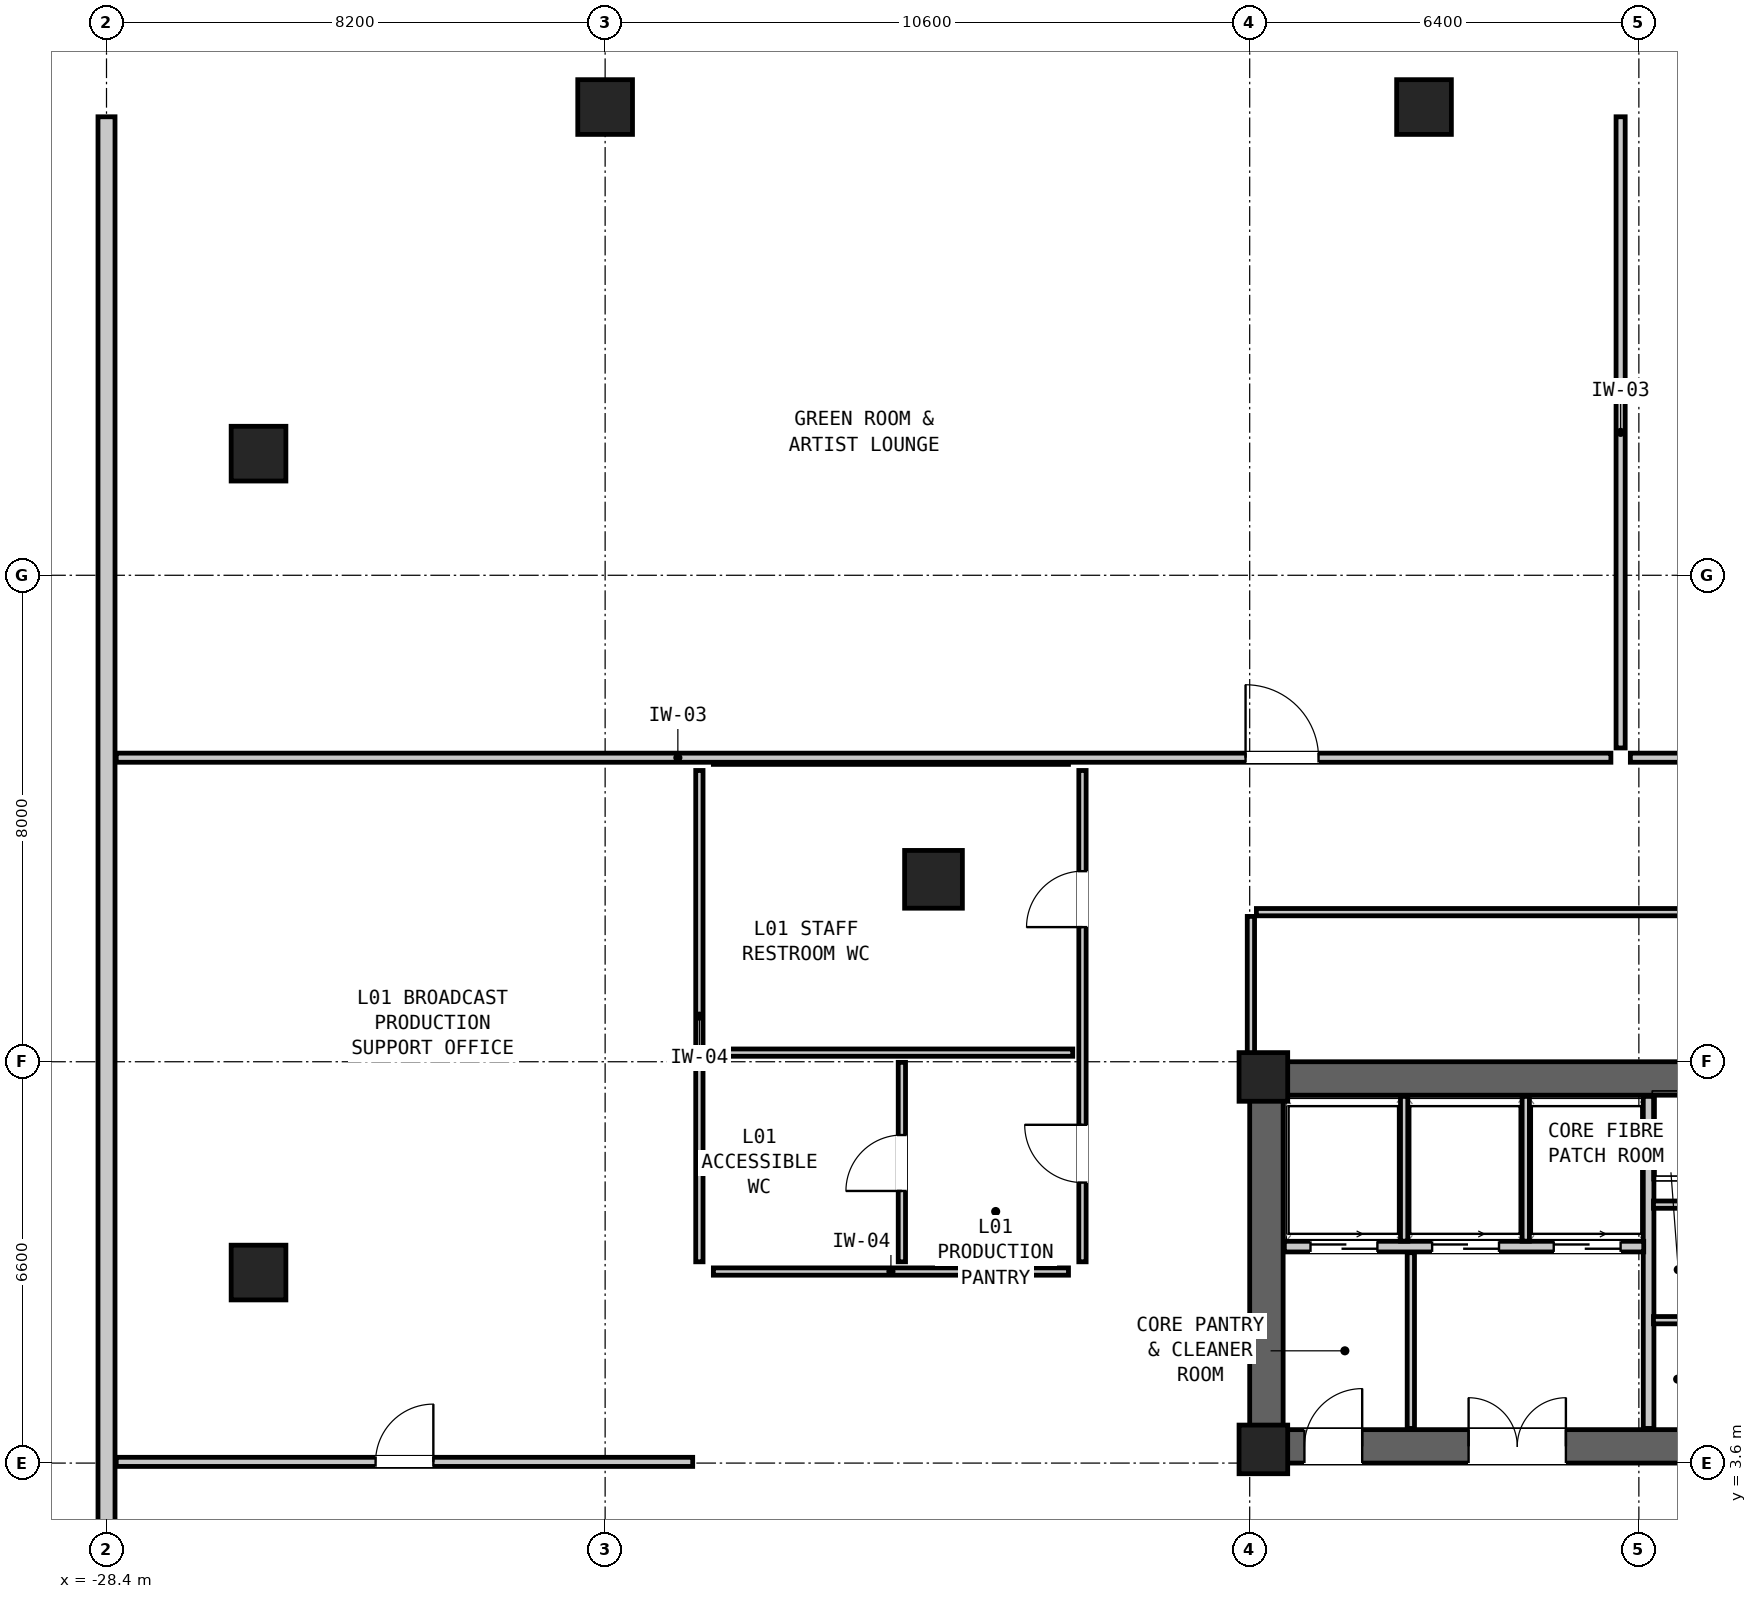
"""IFC4 building model, lengths in metres.
Left out: names, types, materials, properties, quantities, classifications, styles, units other than length and angle.
Written with IfcOpenShell. Run it as: python <this file> out.ifc"""

import sys

from ifc_helpers import new_model, si_unit, direction, frame, frame_2d, origin, origin_2d, place, context, subcontext, project, spatial, rectangle, hollow_rectangle, extrude, element, fill, save


model = new_model("IFC4")
c1 = context("Model", 3, precision=1e-05, world=origin(), true_north=direction((0.0, 1.0)))
c2 = subcontext(c1, "Body", "Model", "MODEL_VIEW")
j1 = project(units=[si_unit("LENGTHUNIT", "METRE"), si_unit("PLANEANGLEUNIT", "RADIAN")], contexts=[c1])
p1 = place(None, origin())
s1 = spatial("IfcSite", under=j1, at=p1, CompositionType="ELEMENT")
p2 = place(p1, origin())
s2 = spatial("IfcBuilding", under=s1, at=p2, CompositionType="ELEMENT")
p3 = place(p2, frame((0.0, 0.0, 5.1)))
s3 = spatial("IfcBuildingStorey", under=s2, at=p3, CompositionType="ELEMENT", Elevation=5.1)
p4 = place(p3, frame((-9.6, 9.925, 0.0), z_axis=(0.0, 0.0, 1.0), x_axis=(1.0, 0.0, 0.0)))
e1 = element("IfcWall", 1, at=p4, inside=s3, PredefinedType="SHEAR", context=c2, shape_type="SweptSolid", body=[
    extrude(rectangle(XDim=19.2, YDim=0.55, at=frame_2d((9.6, 0.0))), origin(), (0.0, 0.0, 1.0), 4.2),
])
p5 = place(p3, frame((-9.6, 3.875, 0.0), z_axis=(0.0, 0.0, 1.0), x_axis=(1.0, 0.0, 0.0)))
e2 = element("IfcWall", 2, at=p5, inside=s3, PredefinedType="SHEAR", context=c2, shape_type="SweptSolid", body=[
    extrude(rectangle(XDim=19.2, YDim=0.55, at=frame_2d((9.6, 0.0))), origin(), (0.0, 0.0, 1.0), 4.2),
])
p6 = place(p5, frame((14.2, 0.0, 0.0)))
e3 = element("IfcOpeningElement", 3, at=p6, cuts=e2, PredefinedType="OPENING", context=c2, shape_type="SweptSolid", body=[
    extrude(rectangle(XDim=1.1, YDim=2.08, at=frame_2d((0.55, 1.04))), frame((0.0, 0.287, 0.0), z_axis=(0.0, -1.0, 0.0), x_axis=(1.0, 0.0, 0.0)), (0.0, 0.0, 1.0), 0.574),
])
p7 = place(p5, frame((8.2, 0.0, 0.0)))
e4 = element("IfcOpeningElement", 4, at=p7, cuts=e2, PredefinedType="OPENING", context=c2, shape_type="SweptSolid", body=[
    extrude(rectangle(XDim=1.15, YDim=2.1, at=frame_2d((0.575, 1.05))), frame((0.0, 0.287, 0.0), z_axis=(0.0, -1.0, 0.0), x_axis=(1.0, 0.0, 0.0)), (0.0, 0.0, 1.0), 0.574),
])
p8 = place(p5, frame((0.9, 0.0, 0.0)))
e5 = element("IfcOpeningElement", 5, at=p8, cuts=e2, PredefinedType="OPENING", context=c2, shape_type="SweptSolid", body=[
    extrude(rectangle(XDim=0.95, YDim=2.1, at=frame_2d((0.475, 1.05))), frame((0.0, 0.287, 0.0), z_axis=(0.0, -1.0, 0.0), x_axis=(1.0, 0.0, 0.0)), (0.0, 0.0, 1.0), 0.574),
])
p9 = place(p5, frame((3.6, 0.0, 0.0)))
e6 = element("IfcOpeningElement", 6, at=p9, cuts=e2, PredefinedType="OPENING", context=c2, shape_type="SweptSolid", body=[
    extrude(rectangle(XDim=1.6, YDim=2.12, at=frame_2d((0.8, 1.06))), frame((0.0, 0.287, 0.0), z_axis=(0.0, -1.0, 0.0), x_axis=(1.0, 0.0, 0.0)), (0.0, 0.0, 1.0), 0.574),
])
p10 = place(p3, frame((-9.325, 3.6, 0.0), z_axis=(0.0, 0.0, 1.0), x_axis=(0.0, 1.0, 0.0)))
e7 = element("IfcWall", 7, at=p10, inside=s3, PredefinedType="SHEAR", context=c2, shape_type="SweptSolid", body=[
    extrude(rectangle(XDim=6.6, YDim=0.55, at=frame_2d((3.3, 0.0))), origin(), (0.0, 0.0, 1.0), 4.2),
])
p11 = place(p3, frame((-14.8, 13.2, 0.0), z_axis=(0.0, 0.0, 1.0), x_axis=(1.0, 0.0, 0.0)))
e8 = element("IfcColumn", 8, at=p11, inside=s3, PredefinedType="COLUMN", context=c2, shape_type="SweptSolid", body=[
    extrude(hollow_rectangle(XDim=0.95, YDim=0.95, WallThickness=0.06, at=origin_2d()), origin(), (0.0, 0.0, 1.0), 4.2),
])
for number, where, z_axis, x_axis in (
    (9, (-6.733, 25.9, 0.0), (0.0, 0.0, 1.0), (1.0, 0.0, 0.0)),
    (10, (-20.2, 25.9, 0.0), (0.0, 0.0, 1.0), (1.0, 0.0, 0.0)),
    (11, (-25.9, 20.2, 0.0), (0.0, 0.0, 1.0), (0.0, 1.0, 0.0)),
    (12, (-25.9, 6.733, 0.0), (0.0, 0.0, 1.0), (0.0, 1.0, 0.0)),
):
    element("IfcColumn", number, at=place(p3, frame(where, z_axis=z_axis, x_axis=x_axis)), inside=s3, PredefinedType="COLUMN", context=c2, shape_type="SweptSolid", body=[
        extrude(hollow_rectangle(XDim=0.9, YDim=0.9, WallThickness=0.055, at=origin_2d()), origin(), (0.0, 0.0, 1.0), 4.2),
    ])
for number, where, z_axis, x_axis in (
    (13, (-9.375, 9.95, 0.0), (0.0, 0.0, 1.0), (1.0, 0.0, 0.0)),
    (14, (-9.375, 3.825, 0.0), (0.0, 0.0, 1.0), (1.0, 0.0, 0.0)),
):
    element("IfcColumn", number, at=place(p3, frame(where, z_axis=z_axis, x_axis=x_axis)), inside=s3, PredefinedType="COLUMN", context=c2, shape_type="SweptSolid", body=[
        extrude(rectangle(XDim=0.8, YDim=0.8, at=origin_2d()), origin(), (0.0, 0.0, 1.0), 4.2),
    ])
p12 = place(p3, frame((-3.04, 4.17, 0.0), z_axis=(0.0, 0.0, 1.0), x_axis=(0.0, 1.0, 0.0)))
e15 = element("IfcWall", 15, at=p12, inside=s3, PredefinedType="PARTITIONING", context=c2, shape_type="SweptSolid", body=[
    extrude(rectangle(XDim=5.46, YDim=0.175, at=frame_2d((2.73, 0.0))), origin(), (0.0, 0.0, 1.0), 3.88),
])
for number, where, z_axis, x_axis in (
    (16, (-2.96, 5.95, 0.0), (0.0, 0.0, 1.0), (1.0, 0.0, 0.0)),
    (17, (-2.96, 7.85, 0.0), (0.0, 0.0, 1.0), (1.0, 0.0, 0.0)),
):
    element("IfcWall", number, at=place(p3, frame(where, z_axis=z_axis, x_axis=x_axis)), inside=s3, PredefinedType="PARTITIONING", context=c2, shape_type="SweptSolid", body=[
        extrude(rectangle(XDim=1.36, YDim=0.12, at=frame_2d((0.68, 0.0))), origin(), (0.0, 0.0, 1.0), 3.88),
    ])
p13 = place(p3, frame((-9.03, 7.16, 0.0), z_axis=(0.0, 0.0, 1.0), x_axis=(1.0, 0.0, 0.0)))
e18 = element("IfcWall", 18, at=p13, inside=s3, PredefinedType="PARTITIONING", context=c2, shape_type="SweptSolid", body=[
    extrude(rectangle(XDim=5.91, YDim=0.175, at=frame_2d((2.955, 0.0))), origin(), (0.0, 0.0, 1.0), 3.88),
])
p14 = place(p13, frame((0.43, 0.0, 0.0)))
e19 = element("IfcOpeningElement", 19, at=p14, cuts=e18, PredefinedType="OPENING", context=c2, shape_type="SweptSolid", body=[
    extrude(rectangle(XDim=1.1, YDim=2.06, at=frame_2d((0.55, 1.03))), frame((0.0, 0.1, 0.0), z_axis=(0.0, -1.0, 0.0), x_axis=(1.0, 0.0, 0.0)), (0.0, 0.0, 1.0), 0.199),
])
p15 = place(p13, frame((2.43, 0.0, 0.0)))
e20 = element("IfcOpeningElement", 20, at=p15, cuts=e18, PredefinedType="OPENING", context=c2, shape_type="SweptSolid", body=[
    extrude(rectangle(XDim=1.1, YDim=2.06, at=frame_2d((0.55, 1.03))), frame((0.0, 0.1, 0.0), z_axis=(0.0, -1.0, 0.0), x_axis=(1.0, 0.0, 0.0)), (0.0, 0.0, 1.0), 0.199),
])
p16 = place(p13, frame((4.43, 0.0, 0.0)))
e21 = element("IfcOpeningElement", 21, at=p16, cuts=e18, PredefinedType="OPENING", context=c2, shape_type="SweptSolid", body=[
    extrude(rectangle(XDim=1.1, YDim=2.06, at=frame_2d((0.55, 1.03))), frame((0.0, 0.1, 0.0), z_axis=(0.0, -1.0, 0.0), x_axis=(1.0, 0.0, 0.0)), (0.0, 0.0, 1.0), 0.199),
])
for number, where, z_axis, x_axis in (
    (22, (-7.06, 7.25, 0.0), (0.0, 0.0, 1.0), (0.0, 1.0, 0.0)),
    (23, (-5.06, 7.25, 0.0), (0.0, 0.0, 1.0), (0.0, 1.0, 0.0)),
):
    element("IfcWall", number, at=place(p3, frame(where, z_axis=z_axis, x_axis=x_axis)), inside=s3, PredefinedType="PARTITIONING", context=c2, shape_type="SweptSolid", body=[
        extrude(rectangle(XDim=2.38, YDim=0.12, at=frame_2d((1.19, 0.0))), origin(), (0.0, 0.0, 1.0), 3.88),
    ])
p17 = place(p3, frame((-6.95, 4.17, 0.0), z_axis=(0.0, 0.0, 1.0), x_axis=(0.0, 1.0, 0.0)))
e24 = element("IfcWall", 24, at=p17, inside=s3, PredefinedType="PARTITIONING", context=c2, shape_type="SweptSolid", body=[
    extrude(rectangle(XDim=2.89, YDim=0.12, at=frame_2d((1.445, 0.0))), origin(), (0.0, 0.0, 1.0), 3.88),
])
for number, where, z_axis, x_axis in (
    (25, (-18.42, 6.75, 0.0), (0.0, 0.0, 1.0), (1.0, 0.0, 0.0)),
    (26, (-18.42, 15.15, 0.0), (0.0, 0.0, 1.0), (1.0, 0.0, 0.0)),
):
    element("IfcWall", number, at=place(p3, frame(where, z_axis=z_axis, x_axis=x_axis)), inside=s3, PredefinedType="PARTITIONING", context=c2, shape_type="SweptSolid", body=[
        extrude(rectangle(XDim=5.84, YDim=0.12, at=frame_2d((2.92, 0.0))), origin(), (0.0, 0.0, 1.0), 3.88),
    ])
p18 = place(p3, frame((-18.65, 6.91, 0.0), z_axis=(0.0, 0.0, 1.0), x_axis=(0.0, 1.0, 0.0)))
e27 = element("IfcWall", 27, at=p18, inside=s3, PredefinedType="PARTITIONING", context=c2, shape_type="SweptSolid", body=[
    extrude(rectangle(XDim=8.08, YDim=0.12, at=frame_2d((4.04, 0.0))), origin(), (0.0, 0.0, 1.0), 3.88),
])
p19 = place(p3, frame((-18.49, 10.35, 0.0), z_axis=(0.0, 0.0, 1.0), x_axis=(1.0, 0.0, 0.0)))
e28 = element("IfcWall", 28, at=p19, inside=s3, PredefinedType="PARTITIONING", context=c2, shape_type="SweptSolid", body=[
    extrude(rectangle(XDim=5.98, YDim=0.12, at=frame_2d((2.99, 0.0))), origin(), (0.0, 0.0, 1.0), 3.88),
])
p20 = place(p3, frame((-15.32, 6.91, 0.0), z_axis=(0.0, 0.0, 1.0), x_axis=(0.0, 1.0, 0.0)))
e29 = element("IfcWall", 29, at=p20, inside=s3, PredefinedType="PARTITIONING", context=c2, shape_type="SweptSolid", body=[
    extrude(rectangle(XDim=3.28, YDim=0.12, at=frame_2d((1.64, 0.0))), origin(), (0.0, 0.0, 1.0), 3.88),
])
p21 = place(p20, frame((1.165, 0.0, 0.0)))
e30 = element("IfcOpeningElement", 30, at=p21, cuts=e29, PredefinedType="OPENING", context=c2, shape_type="SweptSolid", body=[
    extrude(rectangle(XDim=0.92, YDim=2.1, at=frame_2d((0.46, 1.05))), frame((0.0, 0.072, 0.0), z_axis=(0.0, -1.0, 0.0), x_axis=(1.0, 0.0, 0.0)), (0.0, 0.0, 1.0), 0.144),
])
p22 = place(p3, frame((-12.35, 6.91, 0.0), z_axis=(0.0, 0.0, 1.0), x_axis=(0.0, 1.0, 0.0)))
e31 = element("IfcWall", 31, at=p22, inside=s3, PredefinedType="PARTITIONING", context=c2, shape_type="SweptSolid", body=[
    extrude(rectangle(XDim=8.08, YDim=0.12, at=frame_2d((4.04, 0.0))), origin(), (0.0, 0.0, 1.0), 3.88),
])
p23 = place(p22, frame((1.303, 0.0, 0.0)))
e32 = element("IfcOpeningElement", 32, at=p23, cuts=e31, PredefinedType="OPENING", context=c2, shape_type="SweptSolid", body=[
    extrude(rectangle(XDim=0.95, YDim=2.1, at=frame_2d((0.475, 1.05))), frame((0.0, 0.072, 0.0), z_axis=(0.0, -1.0, 0.0), x_axis=(1.0, 0.0, 0.0)), (0.0, 0.0, 1.0), 0.144),
])
p24 = place(p22, frame((5.504, 0.0, 0.0)))
e33 = element("IfcOpeningElement", 33, at=p24, cuts=e31, PredefinedType="OPENING", context=c2, shape_type="SweptSolid", body=[
    extrude(rectangle(XDim=0.92, YDim=2.1, at=frame_2d((0.46, 1.05))), frame((0.0, 0.072, 0.0), z_axis=(0.0, -1.0, 0.0), x_axis=(1.0, 0.0, 0.0)), (0.0, 0.0, 1.0), 0.144),
])
p25 = place(p3, frame((-28.4, -25.74, 0.0), z_axis=(0.0, 0.0, 1.0), x_axis=(0.0, 1.0, 0.0)))
e34 = element("IfcWall", 34, at=p25, inside=s3, PredefinedType="MOVABLE", context=c2, shape_type="SweptSolid", body=[
    extrude(rectangle(XDim=51.48, YDim=0.28, at=frame_2d((25.74, 0.0))), origin(), (0.0, 0.0, 1.0), 3.88),
])
p26 = place(p25, frame((25.255, 0.0, 0.0)))
e35 = element("IfcOpeningElement", 35, at=p26, cuts=e34, PredefinedType="OPENING", context=c2, shape_type="SweptSolid", body=[
    extrude(rectangle(XDim=2.0, YDim=2.14, at=frame_2d((1.0, 1.07))), frame((0.0, 0.152, 0.0), z_axis=(0.0, -1.0, 0.0), x_axis=(1.0, 0.0, 0.0)), (0.0, 0.0, 1.0), 0.304),
])
p27 = place(p3, frame((-28.24, 15.2, 0.0), z_axis=(0.0, 0.0, 1.0), x_axis=(1.0, 0.0, 0.0)))
e36 = element("IfcWall", 36, at=p27, inside=s3, PredefinedType="PARTITIONING", context=c2, shape_type="SweptSolid", body=[
    extrude(rectangle(XDim=24.58, YDim=0.15, at=frame_2d((12.29, 0.0))), origin(), (0.0, 0.0, 1.0), 3.88),
])
p28 = place(p27, frame((18.572, 0.0, 0.0)))
e37 = element("IfcOpeningElement", 37, at=p28, cuts=e36, PredefinedType="OPENING", context=c2, shape_type="SweptSolid", body=[
    extrude(rectangle(XDim=1.2, YDim=2.1, at=frame_2d((0.6, 1.05))), frame((0.0, 0.087, 0.0), z_axis=(0.0, -1.0, 0.0), x_axis=(1.0, 0.0, 0.0)), (0.0, 0.0, 1.0), 0.174),
])
p29 = place(p3, frame((-3.34, 15.2, 0.0), z_axis=(0.0, 0.0, 1.0), x_axis=(1.0, 0.0, 0.0)))
e38 = element("IfcWall", 38, at=p29, inside=s3, PredefinedType="PARTITIONING", context=c2, shape_type="SweptSolid", body=[
    extrude(rectangle(XDim=23.58, YDim=0.15, at=frame_2d((11.79, 0.0))), origin(), (0.0, 0.0, 1.0), 3.88),
])
p30 = place(p29, frame((5.295, 0.0, 0.0)))
e39 = element("IfcOpeningElement", 39, at=p30, cuts=e38, PredefinedType="OPENING", context=c2, shape_type="SweptSolid", body=[
    extrude(rectangle(XDim=1.2, YDim=2.1, at=frame_2d((0.6, 1.05))), frame((0.0, 0.087, 0.0), z_axis=(0.0, -1.0, 0.0), x_axis=(1.0, 0.0, 0.0)), (0.0, 0.0, 1.0), 0.174),
])
p31 = place(p3, frame((-3.5, 15.36, 0.0), z_axis=(0.0, 0.0, 1.0), x_axis=(0.0, 1.0, 0.0)))
e40 = element("IfcWall", 40, at=p31, inside=s3, PredefinedType="PARTITIONING", context=c2, shape_type="SweptSolid", body=[
    extrude(rectangle(XDim=10.38, YDim=0.15, at=frame_2d((5.19, 0.0))), origin(), (0.0, 0.0, 1.0), 3.88),
])
p32 = place(p3, frame((-9.49, 12.66, 0.0), z_axis=(0.0, 0.0, 1.0), x_axis=(1.0, 0.0, 0.0)))
e41 = element("IfcWall", 41, at=p32, inside=s3, PredefinedType="PARTITIONING", context=c2, shape_type="SweptSolid", body=[
    extrude(rectangle(XDim=18.98, YDim=0.12, at=frame_2d((9.49, 0.0))), origin(), (0.0, 0.0, 1.0), 3.88),
])
p33 = place(p32, frame((9.015, 0.0, 0.0)))
e42 = element("IfcOpeningElement", 42, at=p33, cuts=e41, PredefinedType="OPENING", context=c2, shape_type="SweptSolid", body=[
    extrude(rectangle(XDim=0.9, YDim=2.05, at=frame_2d((0.45, 1.025))), frame((0.0, 0.072, 0.0), z_axis=(0.0, -1.0, 0.0), x_axis=(1.0, 0.0, 0.0)), (0.0, 0.0, 1.0), 0.144),
])
p34 = place(p3, frame((-9.58, 10.31, 0.0), z_axis=(0.0, 0.0, 1.0), x_axis=(0.0, 1.0, 0.0)))
e43 = element("IfcWall", 43, at=p34, inside=s3, PredefinedType="PARTITIONING", context=c2, shape_type="SweptSolid", body=[
    extrude(rectangle(XDim=2.28, YDim=0.12, at=frame_2d((1.14, 0.0))), origin(), (0.0, 0.0, 1.0), 3.88),
])
p35 = place(p3, frame((-28.24, 3.62, 0.0), z_axis=(0.0, 0.0, 1.0), x_axis=(1.0, 0.0, 0.0)))
e44 = element("IfcWall", 44, at=p35, inside=s3, PredefinedType="PARTITIONING", context=c2, shape_type="SweptSolid", body=[
    extrude(rectangle(XDim=9.48, YDim=0.15, at=frame_2d((4.74, 0.0))), origin(), (0.0, 0.0, 1.0), 2.742),
])
p36 = place(p35, frame((4.265, 0.0, 0.0)))
e45 = element("IfcOpeningElement", 45, at=p36, cuts=e44, PredefinedType="OPENING", context=c2, shape_type="SweptSolid", body=[
    extrude(rectangle(XDim=0.95, YDim=2.1, at=frame_2d((0.475, 1.05))), frame((0.0, 0.087, 0.0), z_axis=(0.0, -1.0, 0.0), x_axis=(1.0, 0.0, 0.0)), (0.0, 0.0, 1.0), 0.174),
])
p37 = place(p14, origin())
e46 = element("IfcDoor", 46, at=p37, inside=s3, OperationType="DOUBLE_DOOR_SLIDING", PredefinedType="DOOR", context=c2, shape_type="SweptSolid", body=[
    extrude(rectangle(XDim=1.1, YDim=2.06, at=frame_2d((0.55, 1.03))), frame((0.0, 0.025, 0.0), z_axis=(0.0, -1.0, 0.0), x_axis=(1.0, 0.0, 0.0)), (0.0, 0.0, 1.0), 0.05),
])
fill(e19, e46)
p38 = place(p15, origin())
e47 = element("IfcDoor", 47, at=p38, inside=s3, OperationType="DOUBLE_DOOR_SLIDING", PredefinedType="DOOR", context=c2, shape_type="SweptSolid", body=[
    extrude(rectangle(XDim=1.1, YDim=2.06, at=frame_2d((0.55, 1.03))), frame((0.0, 0.025, 0.0), z_axis=(0.0, -1.0, 0.0), x_axis=(1.0, 0.0, 0.0)), (0.0, 0.0, 1.0), 0.05),
])
fill(e20, e47)
p39 = place(p16, origin())
e48 = element("IfcDoor", 48, at=p39, inside=s3, OperationType="DOUBLE_DOOR_SLIDING", PredefinedType="DOOR", context=c2, shape_type="SweptSolid", body=[
    extrude(rectangle(XDim=1.1, YDim=2.06, at=frame_2d((0.55, 1.03))), frame((0.0, 0.025, 0.0), z_axis=(0.0, -1.0, 0.0), x_axis=(1.0, 0.0, 0.0)), (0.0, 0.0, 1.0), 0.05),
])
fill(e21, e48)
p40 = place(p8, origin())
e49 = element("IfcDoor", 49, at=p40, inside=s3, OperationType="SINGLE_SWING_RIGHT", PredefinedType="DOOR", context=c2, shape_type="SweptSolid", body=[
    extrude(rectangle(XDim=0.95, YDim=2.1, at=frame_2d((0.475, 1.05))), frame((0.0, 0.025, 0.0), z_axis=(0.0, -1.0, 0.0), x_axis=(1.0, 0.0, 0.0)), (0.0, 0.0, 1.0), 0.05),
])
fill(e5, e49)
p41 = place(p9, origin())
e50 = element("IfcDoor", 50, at=p41, inside=s3, OperationType="DOUBLE_DOOR_SINGLE_SWING", PredefinedType="DOOR", context=c2, shape_type="SweptSolid", body=[
    extrude(rectangle(XDim=1.6, YDim=2.12, at=frame_2d((0.8, 1.06))), frame((0.0, 0.025, 0.0), z_axis=(0.0, -1.0, 0.0), x_axis=(1.0, 0.0, 0.0)), (0.0, 0.0, 1.0), 0.05),
])
fill(e6, e50)
p42 = place(p21, origin())
e51 = element("IfcDoor", 51, at=p42, inside=s3, OperationType="SINGLE_SWING_LEFT", PredefinedType="DOOR", context=c2, shape_type="SweptSolid", body=[
    extrude(rectangle(XDim=0.92, YDim=2.1, at=frame_2d((0.46, 1.05))), frame((0.0, 0.025, 0.0), z_axis=(0.0, -1.0, 0.0), x_axis=(1.0, 0.0, 0.0)), (0.0, 0.0, 1.0), 0.05),
])
fill(e30, e51)
p43 = place(p23, origin())
e52 = element("IfcDoor", 52, at=p43, inside=s3, OperationType="SINGLE_SWING_RIGHT", PredefinedType="DOOR", context=c2, shape_type="SweptSolid", body=[
    extrude(rectangle(XDim=0.95, YDim=2.1, at=frame_2d((0.475, 1.05))), frame((0.0, 0.025, 0.0), z_axis=(0.0, -1.0, 0.0), x_axis=(1.0, 0.0, 0.0)), (0.0, 0.0, 1.0), 0.05),
])
fill(e32, e52)
p44 = place(p24, origin())
e53 = element("IfcDoor", 53, at=p44, inside=s3, OperationType="SINGLE_SWING_LEFT", PredefinedType="DOOR", context=c2, shape_type="SweptSolid", body=[
    extrude(rectangle(XDim=0.92, YDim=2.1, at=frame_2d((0.46, 1.05))), frame((0.0, 0.025, 0.0), z_axis=(0.0, -1.0, 0.0), x_axis=(1.0, 0.0, 0.0)), (0.0, 0.0, 1.0), 0.05),
])
fill(e33, e53)
p45 = place(p28, origin())
e54 = element("IfcDoor", 54, at=p45, inside=s3, OperationType="SINGLE_SWING_LEFT", PredefinedType="DOOR", context=c2, shape_type="SweptSolid", body=[
    extrude(rectangle(XDim=1.2, YDim=2.1, at=frame_2d((0.6, 1.05))), frame((0.0, 0.025, 0.0), z_axis=(0.0, -1.0, 0.0), x_axis=(1.0, 0.0, 0.0)), (0.0, 0.0, 1.0), 0.05),
])
fill(e37, e54)
p46 = place(p36, origin())
e55 = element("IfcDoor", 55, at=p46, inside=s3, OperationType="SINGLE_SWING_RIGHT", PredefinedType="DOOR", context=c2, shape_type="SweptSolid", body=[
    extrude(rectangle(XDim=0.95, YDim=2.1, at=frame_2d((0.475, 1.05))), frame((0.0, 0.025, 0.0), z_axis=(0.0, -1.0, 0.0), x_axis=(1.0, 0.0, 0.0)), (0.0, 0.0, 1.0), 0.05),
])
fill(e45, e55)
save(model, sys.argv[1])
